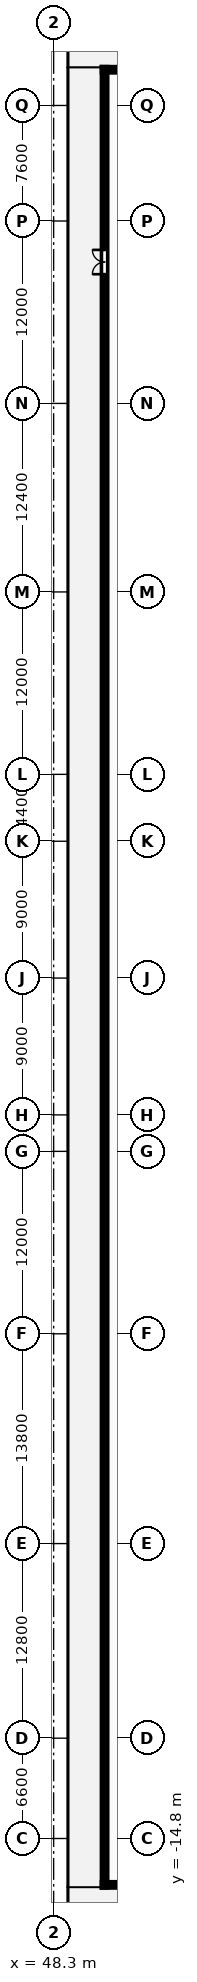
"""IFC4 building model, lengths in metres.
Left out: names, types, materials, properties, quantities, classifications, styles, units other than length and angle.
Written with IfcOpenShell. Run it as: python <this file> out.ifc"""

import sys

from ifc_helpers import new_model, si_unit, direction, frame, frame_2d, origin, place, context, subcontext, project, spatial, rectangle, extrude, element, fill, save


model = new_model("IFC4")
c1 = context("Model", 3, precision=1e-05, world=origin(), true_north=direction((0.0, 1.0)))
c2 = subcontext(c1, "Body", "Model", "MODEL_VIEW")
j1 = project(units=[si_unit("LENGTHUNIT", "METRE"), si_unit("PLANEANGLEUNIT", "RADIAN")], contexts=[c1])
p1 = place(None, origin())
s1 = spatial("IfcSite", under=j1, at=p1, CompositionType="ELEMENT")
p2 = place(p1, origin())
s2 = spatial("IfcBuilding", under=s1, at=p2, CompositionType="ELEMENT")
p3 = place(p2, frame((0.0, 0.0, 14.5)))
s3 = spatial("IfcBuildingStorey", under=s2, at=p3, CompositionType="ELEMENT", Elevation=14.5)
p4 = place(p3, frame((51.5, -17.85, 0.0), z_axis=(0.0, 0.0, 1.0), x_axis=(1.0, 0.0, 0.0)))
e1 = element("IfcWall", 1, at=p4, inside=s3, PredefinedType="STANDARD", context=c2, shape_type="SweptSolid", body=[
    extrude(rectangle(XDim=36.5, YDim=0.3, at=frame_2d((18.25, 0.0))), origin(), (0.0, 0.0, 1.0), 4.18),
])
p5 = place(p4, frame((14.0, 0.0, 0.0)))
e2 = element("IfcOpeningElement", 2, at=p5, cuts=e1, PredefinedType="OPENING", context=c2, shape_type="SweptSolid", body=[
    extrude(rectangle(XDim=1.6, YDim=2.2, at=frame_2d((0.8, 1.1))), frame((0.0, 0.16, 0.0), z_axis=(0.0, -1.0, 0.0), x_axis=(1.0, 0.0, 0.0)), (0.0, 0.0, 1.0), 0.32),
])
p6 = place(p4, frame((24.0, 0.0, 0.9)))
e3 = element("IfcOpeningElement", 3, at=p6, cuts=e1, PredefinedType="OPENING", context=c2, shape_type="SweptSolid", body=[
    extrude(rectangle(XDim=3.0, YDim=2.6, at=frame_2d((1.5, 1.3))), frame((0.0, 0.16, 0.0), z_axis=(0.0, -1.0, 0.0), x_axis=(1.0, 0.0, 0.0)), (0.0, 0.0, 1.0), 0.32),
])
p7 = place(p3, frame((86.0, 101.55, 0.0), z_axis=(0.0, 0.0, 1.0), x_axis=(-1.0, 0.0, 0.0)))
e4 = element("IfcWall", 4, at=p7, inside=s3, PredefinedType="STANDARD", context=c2, shape_type="SweptSolid", body=[
    extrude(rectangle(XDim=34.5, YDim=0.3, at=frame_2d((17.25, 0.0))), origin(), (0.0, 0.0, 1.0), 4.18),
])
p8 = place(p3, frame((51.65, 101.7, 0.0), z_axis=(0.0, 0.0, 1.0), x_axis=(0.0, -1.0, 0.0)))
e5 = element("IfcWall", 5, at=p8, inside=s3, PredefinedType="STANDARD", context=c2, shape_type="SweptSolid", body=[
    extrude(rectangle(XDim=119.7, YDim=0.3, at=frame_2d((59.85, 0.0))), origin(), (0.0, 0.0, 1.0), 4.18),
])
p9 = place(p8, frame((12.0, 0.0, 0.0)))
e6 = element("IfcOpeningElement", 6, at=p9, cuts=e5, PredefinedType="OPENING", context=c2, shape_type="SweptSolid", body=[
    extrude(rectangle(XDim=1.6, YDim=2.2, at=frame_2d((0.8, 1.1))), frame((0.0, 0.16, 0.0), z_axis=(0.0, -1.0, 0.0), x_axis=(1.0, 0.0, 0.0)), (0.0, 0.0, 1.0), 0.32),
])
p10 = place(p9, frame((1.6, 0.0, 0.0), z_axis=(0.0, 0.0, 1.0), x_axis=(-1.0, 0.0, 0.0)))
e7 = element("IfcDoor", 7, at=p10, inside=s3, OperationType="DOUBLE_DOOR_SINGLE_SWING", PredefinedType="DOOR", context=c2, shape_type="SweptSolid", body=[
    extrude(rectangle(XDim=1.6, YDim=2.2, at=frame_2d((0.8, 1.1))), frame((0.0, 0.025, 0.0), z_axis=(0.0, -1.0, 0.0), x_axis=(1.0, 0.0, 0.0)), (0.0, 0.0, 1.0), 0.05),
])
fill(e6, e7)
save(model, sys.argv[1])
